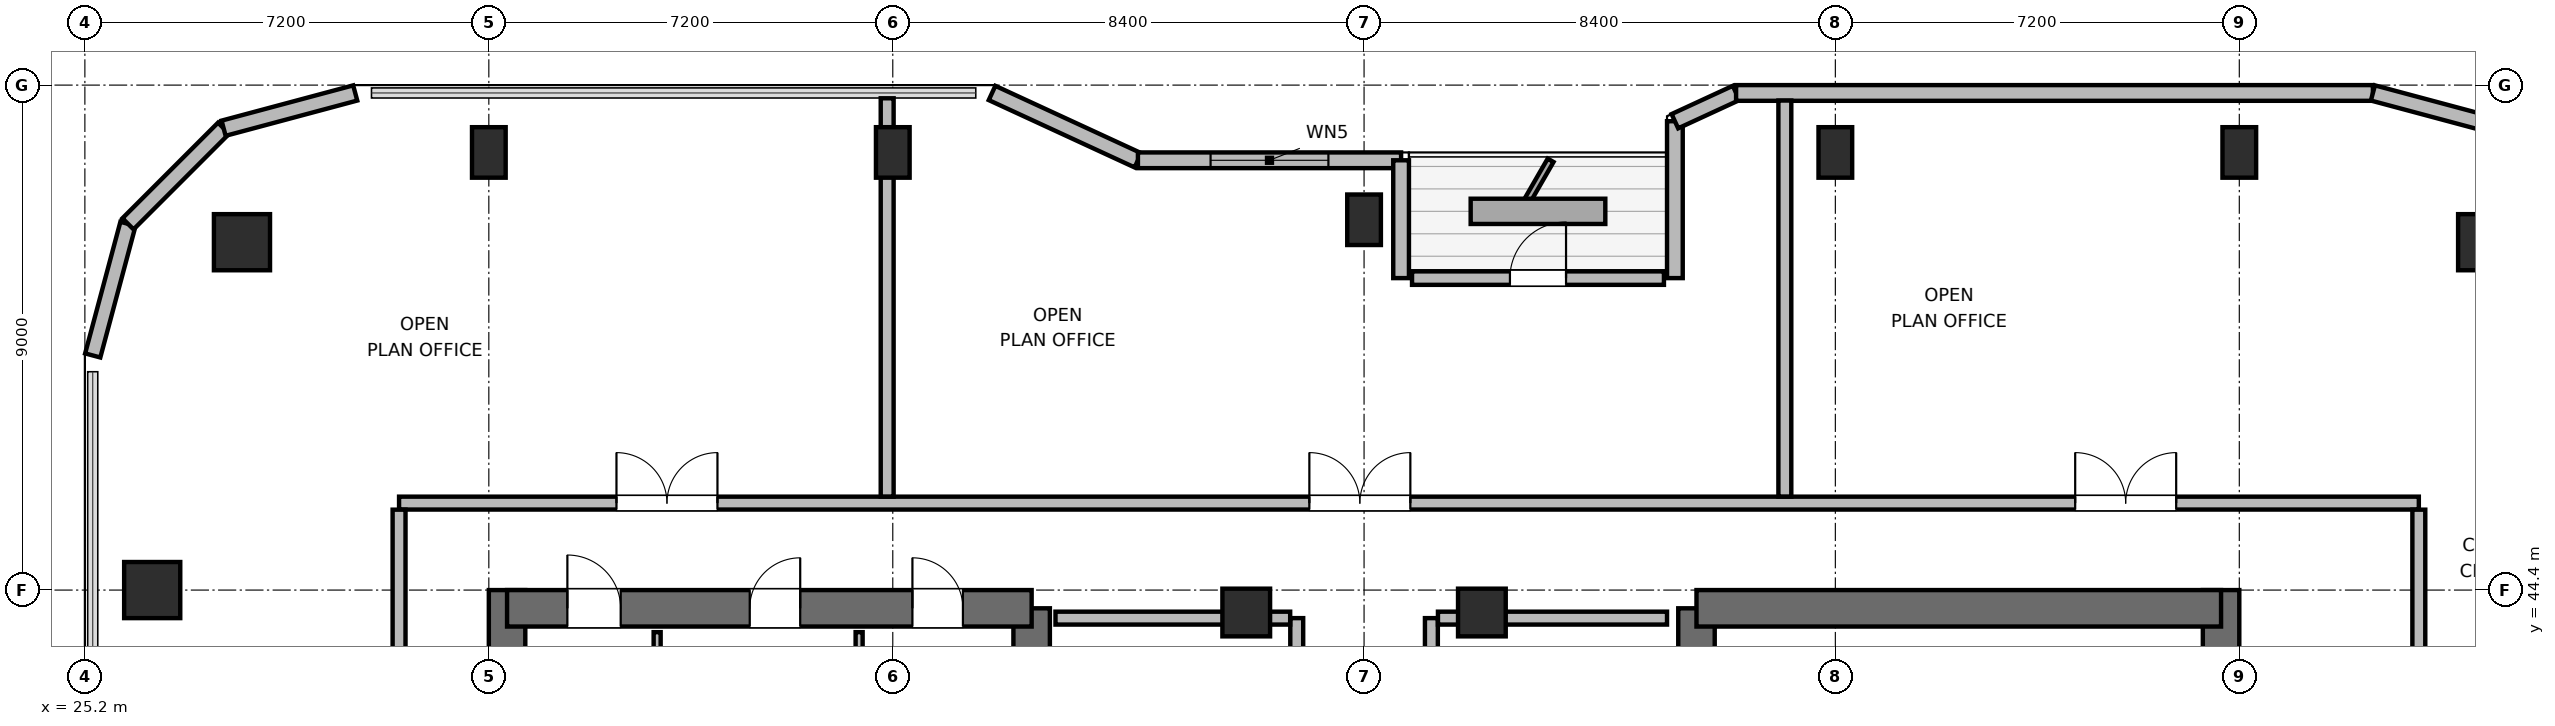
"""IFC4 building model, lengths in metres.
Left out: names, types, materials, properties, quantities, classifications, styles, units other than length and angle.
Written with IfcOpenShell. Run it as: python <this file> out.ifc"""

import sys

from ifc_helpers import new_model, si_unit, direction, frame, frame_2d, origin, origin_2d, place, context, subcontext, project, spatial, rectangle, circle, extrude, element, fill, save


model = new_model("IFC4")
c1 = context("Model", 3, precision=1e-05, world=origin(), true_north=direction((0.0, 1.0)))
c2 = subcontext(c1, "Body", "Model", "MODEL_VIEW")
j1 = project(units=[si_unit("LENGTHUNIT", "METRE"), si_unit("PLANEANGLEUNIT", "RADIAN")], contexts=[c1])
p1 = place(None, origin())
s1 = spatial("IfcSite", under=j1, at=p1, CompositionType="ELEMENT")
p2 = place(p1, origin())
s2 = spatial("IfcBuilding", under=s1, at=p2, CompositionType="ELEMENT")
p3 = place(p2, frame((0.0, 0.0, 255.0)))
s3 = spatial("IfcBuildingStorey", under=s2, at=p3, CompositionType="ELEMENT", Elevation=255.0)
p4 = place(p3, frame((32.725, 27.6, 0.0), z_axis=(0.0, 0.0, 1.0), x_axis=(0.0, 1.0, 0.0)))
e1 = element("IfcWall", 1, at=p4, inside=s3, PredefinedType="SHEAR", context=c2, shape_type="SweptSolid", body=[
    extrude(rectangle(XDim=16.8, YDim=0.65, at=frame_2d((8.4, 0.0))), origin(), (0.0, 0.0, 1.0), 3.9),
])
p5 = place(p3, frame((42.075, 37.8, 0.0), z_axis=(0.0, 0.0, 1.0), x_axis=(0.0, 1.0, 0.0)))
e2 = element("IfcWall", 2, at=p5, inside=s3, PredefinedType="SHEAR", context=c2, shape_type="SweptSolid", body=[
    extrude(rectangle(XDim=6.275, YDim=0.65, at=frame_2d((3.137, 0.0))), origin(), (0.0, 0.0, 1.0), 3.9),
])
p6 = place(p3, frame((32.725, 44.075, 0.0), z_axis=(0.0, 0.0, 1.0), x_axis=(1.0, 0.0, 0.0)))
e3 = element("IfcWall", 3, at=p6, inside=s3, PredefinedType="SHEAR", context=c2, shape_type="SweptSolid", body=[
    extrude(rectangle(XDim=9.35, YDim=0.65, at=frame_2d((4.675, 0.0))), origin(), (0.0, 0.0, 1.0), 3.9),
])
p7 = place(p6, frame((1.075, 0.0, 0.0)))
e4 = element("IfcOpeningElement", 4, at=p7, cuts=e3, PredefinedType="OPENING", context=c2, shape_type="SweptSolid", body=[
    extrude(rectangle(XDim=0.95, YDim=2.04, at=frame_2d((0.475, 1.02))), frame((0.0, 0.335, 0.0), z_axis=(0.0, -1.0, 0.0), x_axis=(1.0, 0.0, 0.0)), (0.0, 0.0, 1.0), 0.67),
])
p8 = place(p6, frame((4.325, 0.0, 0.0)))
e5 = element("IfcOpeningElement", 5, at=p8, cuts=e3, PredefinedType="OPENING", context=c2, shape_type="SweptSolid", body=[
    extrude(rectangle(XDim=0.9, YDim=2.02, at=frame_2d((0.45, 1.01))), frame((0.0, 0.335, 0.0), z_axis=(0.0, -1.0, 0.0), x_axis=(1.0, 0.0, 0.0)), (0.0, 0.0, 1.0), 0.67),
])
p9 = place(p6, frame((7.225, 0.0, 0.0)))
e6 = element("IfcOpeningElement", 6, at=p9, cuts=e3, PredefinedType="OPENING", context=c2, shape_type="SweptSolid", body=[
    extrude(rectangle(XDim=0.9, YDim=2.02, at=frame_2d((0.45, 1.01))), frame((0.0, 0.335, 0.0), z_axis=(0.0, -1.0, 0.0), x_axis=(1.0, 0.0, 0.0)), (0.0, 0.0, 1.0), 0.67),
])
p10 = place(p3, frame((53.925, 38.0, 0.0), z_axis=(0.0, 0.0, 1.0), x_axis=(0.0, 1.0, 0.0)))
e7 = element("IfcWall", 7, at=p10, inside=s3, PredefinedType="SHEAR", context=c2, shape_type="SweptSolid", body=[
    extrude(rectangle(XDim=6.075, YDim=0.65, at=frame_2d((3.038, 0.0))), origin(), (0.0, 0.0, 1.0), 3.9),
])
p11 = place(p3, frame((63.275, 27.6, 0.0), z_axis=(0.0, 0.0, 1.0), x_axis=(0.0, 1.0, 0.0)))
e8 = element("IfcWall", 8, at=p11, inside=s3, PredefinedType="SHEAR", context=c2, shape_type="SweptSolid", body=[
    extrude(rectangle(XDim=16.8, YDim=0.65, at=frame_2d((8.4, 0.0))), origin(), (0.0, 0.0, 1.0), 3.9),
])
p12 = place(p3, frame((53.925, 44.075, 0.0), z_axis=(0.0, 0.0, 1.0), x_axis=(1.0, 0.0, 0.0)))
e9 = element("IfcWall", 9, at=p12, inside=s3, PredefinedType="SHEAR", context=c2, shape_type="SweptSolid", body=[
    extrude(rectangle(XDim=9.35, YDim=0.65, at=frame_2d((4.675, 0.0))), origin(), (0.0, 0.0, 1.0), 3.9),
])
for number, where, z_axis, x_axis in (
    (10, (68.0, 50.6, 0.0), (0.0, 0.0, 1.0), (1.0, 0.0, 0.0)),
    (11, (28.0, 50.6, 0.0), (0.0, 0.0, 1.0), (1.0, 0.0, 0.0)),
):
    element("IfcColumn", number, at=place(p3, frame(where, z_axis=z_axis, x_axis=x_axis)), inside=s3, PredefinedType="COLUMN", context=c2, shape_type="SweptSolid", body=[
        extrude(circle(Radius=0.5, at=origin_2d()), origin(), (0.0, 0.0, 1.0), 3.9),
    ])
for number, where, z_axis, x_axis in (
    (12, (32.4, 52.2, 0.0), (0.0, 0.0, 1.0), (1.0, 0.0, 0.0)),
    (13, (39.6, 52.2, 0.0), (0.0, 0.0, 1.0), (1.0, 0.0, 0.0)),
    (14, (48.0, 51.0, 0.0), (0.0, 0.0, 1.0), (1.0, 0.0, 0.0)),
    (15, (56.4, 52.2, 0.0), (0.0, 0.0, 1.0), (1.0, 0.0, 0.0)),
    (16, (63.6, 52.2, 0.0), (0.0, 0.0, 1.0), (1.0, 0.0, 0.0)),
):
    element("IfcColumn", number, at=place(p3, frame(where, z_axis=z_axis, x_axis=x_axis)), inside=s3, PredefinedType="COLUMN", context=c2, shape_type="SweptSolid", body=[
        extrude(rectangle(XDim=0.6, YDim=0.9, at=origin_2d()), origin(), (0.0, 0.0, 1.0), 3.9),
    ])
p13 = place(p3, frame((26.4, 44.4, 0.0), z_axis=(0.0, 0.0, 1.0), x_axis=(1.0, 0.0, 0.0)))
e17 = element("IfcColumn", 17, at=p13, inside=s3, PredefinedType="COLUMN", context=c2, shape_type="SweptSolid", body=[
    extrude(rectangle(XDim=1.0, YDim=1.0, at=origin_2d()), origin(), (0.0, 0.0, 1.0), 3.9),
])
for number, where, z_axis, x_axis in (
    (18, (45.9, 44.0, 0.0), (0.0, 0.0, 1.0), (1.0, 0.0, 0.0)),
    (19, (50.1, 44.0, 0.0), (0.0, 0.0, 1.0), (1.0, 0.0, 0.0)),
):
    element("IfcColumn", number, at=place(p3, frame(where, z_axis=z_axis, x_axis=x_axis)), inside=s3, PredefinedType="COLUMN", context=c2, shape_type="SweptSolid", body=[
        extrude(rectangle(XDim=0.85, YDim=0.85, at=origin_2d()), origin(), (0.0, 0.0, 1.0), 3.9),
    ])
p14 = place(p3, frame((25.34, 48.582, 0.0), z_axis=(0.0, 0.0, 1.0), x_axis=(0.258751159445, 0.965944013639, 0.0)))
e20 = element("IfcWall", 20, at=p14, inside=s3, PredefinedType="SOLIDWALL", context=c2, shape_type="SweptSolid", body=[
    extrude(rectangle(XDim=2.429, YDim=0.28, at=frame_2d((1.214, 0.0))), origin(), (0.0, 0.0, 1.0), 3.68),
])
p15 = place(p3, frame((25.969, 50.927, 0.0), z_axis=(0.0, 0.0, 1.0), x_axis=(0.707106781187, 0.707106781187, 0.0)))
e21 = element("IfcWall", 21, at=p15, inside=s3, PredefinedType="SOLIDWALL", context=c2, shape_type="SweptSolid", body=[
    extrude(rectangle(XDim=2.41, YDim=0.28, at=frame_2d((1.205, 0.0))), origin(), (0.0, 0.0, 1.0), 3.68),
])
p16 = place(p3, frame((27.673, 52.632, 0.0), z_axis=(0.0, 0.0, 1.0), x_axis=(0.965937282298, 0.25877628691, 0.0)))
e22 = element("IfcWall", 22, at=p16, inside=s3, PredefinedType="SOLIDWALL", context=c2, shape_type="SweptSolid", body=[
    extrude(rectangle(XDim=2.428, YDim=0.28, at=frame_2d((1.214, 0.0))), origin(), (0.0, 0.0, 1.0), 3.68),
])
p17 = place(p3, frame((41.369, 53.26, 0.0), z_axis=(0.0, 0.0, 1.0), x_axis=(0.907956889006, -0.419063584324, 0.0)))
e23 = element("IfcWall", 23, at=p17, inside=s3, PredefinedType="SOLIDWALL", context=c2, shape_type="SweptSolid", body=[
    extrude(rectangle(XDim=2.864, YDim=0.28, at=frame_2d((1.432, 0.0))), origin(), (0.0, 0.0, 1.0), 2.265),
])
p18 = place(p3, frame((43.969, 52.06, 0.0), z_axis=(0.0, 0.0, 1.0), x_axis=(1.0, 0.0, 0.0)))
e24 = element("IfcWall", 24, at=p18, inside=s3, PredefinedType="SOLIDWALL", context=c2, shape_type="SweptSolid", body=[
    extrude(rectangle(XDim=4.691, YDim=0.28, at=frame_2d((2.345, 0.0))), origin(), (0.0, 0.0, 1.0), 2.265),
])
p19 = place(p18, frame((1.295, 0.0, 0.85)))
e25 = element("IfcOpeningElement", 25, at=p19, cuts=e24, PredefinedType="OPENING", context=c2, shape_type="SweptSolid", body=[
    extrude(rectangle(XDim=2.1, YDim=1.05, at=frame_2d((1.05, 0.525))), frame((0.0, 0.15, 0.0), z_axis=(0.0, -1.0, 0.0), x_axis=(1.0, 0.0, 0.0)), (0.0, 0.0, 1.0), 0.3),
])
p20 = place(p3, frame((48.66, 52.06, 0.0), z_axis=(0.0, 0.0, 1.0), x_axis=(0.0, -1.0, 0.0)))
e26 = element("IfcWall", 26, at=p20, inside=s3, PredefinedType="SOLIDWALL", context=c2, shape_type="SweptSolid", body=[
    extrude(rectangle(XDim=2.1, YDim=0.28, at=frame_2d((1.05, 0.0))), origin(), (0.0, 0.0, 1.0), 2.265),
])
p21 = place(p3, frame((48.855, 49.96, 0.0), z_axis=(0.0, 0.0, 1.0), x_axis=(1.0, 0.0, 0.0)))
e27 = element("IfcWall", 27, at=p21, inside=s3, PredefinedType="SOLIDWALL", context=c2, shape_type="SweptSolid", body=[
    extrude(rectangle(XDim=4.49, YDim=0.24, at=frame_2d((2.245, 0.0))), origin(), (0.0, 0.0, 1.0), 2.215),
])
p22 = place(p21, frame((1.745, 0.0, 0.0)))
e28 = element("IfcOpeningElement", 28, at=p22, cuts=e27, PredefinedType="OPENING", context=c2, shape_type="SweptSolid", body=[
    extrude(rectangle(XDim=1.0, YDim=2.02, at=frame_2d((0.5, 1.01))), frame((0.0, 0.13, 0.0), z_axis=(0.0, -1.0, 0.0), x_axis=(1.0, 0.0, 0.0)), (0.0, 0.0, 1.0), 0.26),
])
p23 = place(p3, frame((53.54, 49.96, 0.0), z_axis=(0.0, 0.0, 1.0), x_axis=(0.0, 1.0, 0.0)))
e29 = element("IfcWall", 29, at=p23, inside=s3, PredefinedType="SOLIDWALL", context=c2, shape_type="SweptSolid", body=[
    extrude(rectangle(XDim=2.796, YDim=0.28, at=frame_2d((1.398, 0.0))), origin(), (0.0, 0.0, 1.0), 2.265),
])
p24 = place(p3, frame((53.54, 52.756, 0.0), z_axis=(0.0, 0.0, 1.0), x_axis=(0.907893953211, 0.419199916176, 0.0)))
e30 = element("IfcWall", 30, at=p24, inside=s3, PredefinedType="SOLIDWALL", context=c2, shape_type="SweptSolid", body=[
    extrude(rectangle(XDim=1.201, YDim=0.28, at=frame_2d((0.601, 0.0))), origin(), (0.0, 0.0, 1.0), 3.68),
])
p25 = place(p3, frame((54.631, 53.26, 0.0), z_axis=(0.0, 0.0, 1.0), x_axis=(1.0, 0.0, 0.0)))
e31 = element("IfcWall", 31, at=p25, inside=s3, PredefinedType="SOLIDWALL", context=c2, shape_type="SweptSolid", body=[
    extrude(rectangle(XDim=11.351, YDim=0.28, at=frame_2d((5.675, 0.0))), origin(), (0.0, 0.0, 1.0), 3.68),
])
p26 = place(p3, frame((65.982, 53.26, 0.0), z_axis=(0.0, 0.0, 1.0), x_axis=(0.965937282298, -0.25877628691, 0.0)))
e32 = element("IfcWall", 32, at=p26, inside=s3, PredefinedType="SOLIDWALL", context=c2, shape_type="SweptSolid", body=[
    extrude(rectangle(XDim=2.428, YDim=0.28, at=frame_2d((1.214, 0.0))), origin(), (0.0, 0.0, 1.0), 3.68),
])
for number, where, z_axis, x_axis in (
    (33, (35.4, 41.095, 0.0), (0.0, 0.0, 1.0), (0.0, 1.0, 0.0)),
    (34, (39.0, 41.095, 0.0), (0.0, 0.0, 1.0), (0.0, 1.0, 0.0)),
):
    element("IfcWall", number, at=place(p3, frame(where, z_axis=z_axis, x_axis=x_axis)), inside=s3, PredefinedType="PARTITIONING", context=c2, shape_type="SweptSolid", body=[
        extrude(rectangle(XDim=2.555, YDim=0.125, at=frame_2d((1.277, 0.0))), origin(), (0.0, 0.0, 1.0), 3.68),
    ])
p27 = place(p3, frame((46.8, 37.9, 0.0), z_axis=(0.0, 0.0, 1.0), x_axis=(0.0, 1.0, 0.0)))
e35 = element("IfcWall", 35, at=p27, inside=s3, PredefinedType="PARTITIONING", context=c2, shape_type="SweptSolid", body=[
    extrude(rectangle(XDim=6.0, YDim=0.23, at=frame_2d((3.0, 0.0))), origin(), (0.0, 0.0, 1.0), 3.68),
])
p28 = place(p27, frame((2.55, 0.0, 0.0)))
e36 = element("IfcOpeningElement", 36, at=p28, cuts=e35, PredefinedType="OPENING", context=c2, shape_type="SweptSolid", body=[
    extrude(rectangle(XDim=0.9, YDim=2.02, at=frame_2d((0.45, 1.01))), frame((0.0, 0.125, 0.0), z_axis=(0.0, -1.0, 0.0), x_axis=(1.0, 0.0, 0.0)), (0.0, 0.0, 1.0), 0.25),
])
p29 = place(p3, frame((42.5, 43.9, 0.0), z_axis=(0.0, 0.0, 1.0), x_axis=(1.0, 0.0, 0.0)))
e37 = element("IfcWall", 37, at=p29, inside=s3, PredefinedType="PARTITIONING", context=c2, shape_type="SweptSolid", body=[
    extrude(rectangle(XDim=4.183, YDim=0.23, at=frame_2d((2.092, 0.0))), origin(), (0.0, 0.0, 1.0), 2.765),
])
p30 = place(p3, frame((49.2, 37.9, 0.0), z_axis=(0.0, 0.0, 1.0), x_axis=(0.0, 1.0, 0.0)))
e38 = element("IfcWall", 38, at=p30, inside=s3, PredefinedType="PARTITIONING", context=c2, shape_type="SweptSolid", body=[
    extrude(rectangle(XDim=6.0, YDim=0.23, at=frame_2d((3.0, 0.0))), origin(), (0.0, 0.0, 1.0), 3.68),
])
p31 = place(p30, frame((1.47, 0.0, 0.0)))
e39 = element("IfcOpeningElement", 39, at=p31, cuts=e38, PredefinedType="OPENING", context=c2, shape_type="SweptSolid", body=[
    extrude(rectangle(XDim=0.9, YDim=2.02, at=frame_2d((0.45, 1.01))), frame((0.0, 0.125, 0.0), z_axis=(0.0, -1.0, 0.0), x_axis=(1.0, 0.0, 0.0)), (0.0, 0.0, 1.0), 0.25),
])
p32 = place(p30, frame((4.47, 0.0, 0.0)))
e40 = element("IfcOpeningElement", 40, at=p32, cuts=e38, PredefinedType="OPENING", context=c2, shape_type="SweptSolid", body=[
    extrude(rectangle(XDim=0.9, YDim=2.02, at=frame_2d((0.45, 1.01))), frame((0.0, 0.125, 0.0), z_axis=(0.0, -1.0, 0.0), x_axis=(1.0, 0.0, 0.0)), (0.0, 0.0, 1.0), 0.25),
])
p33 = place(p3, frame((49.317, 43.9, 0.0), z_axis=(0.0, 0.0, 1.0), x_axis=(1.0, 0.0, 0.0)))
e41 = element("IfcWall", 41, at=p33, inside=s3, PredefinedType="PARTITIONING", context=c2, shape_type="SweptSolid", body=[
    extrude(rectangle(XDim=4.083, YDim=0.23, at=frame_2d((2.042, 0.0))), origin(), (0.0, 0.0, 1.0), 2.765),
])
p34 = place(p3, frame((30.8, 45.95, 0.0), z_axis=(0.0, 0.0, 1.0), x_axis=(1.0, 0.0, 0.0)))
e42 = element("IfcWall", 42, at=p34, inside=s3, PredefinedType="PARTITIONING", context=c2, shape_type="SweptSolid", body=[
    extrude(rectangle(XDim=36.0, YDim=0.23, at=frame_2d((18.0, 0.0))), origin(), (0.0, 0.0, 1.0), 3.68),
])
p35 = place(p34, frame((3.875, 0.0, 0.0)))
e43 = element("IfcOpeningElement", 43, at=p35, cuts=e42, PredefinedType="OPENING", context=c2, shape_type="SweptSolid", body=[
    extrude(rectangle(XDim=1.8, YDim=2.06, at=frame_2d((0.9, 1.03))), frame((0.0, 0.125, 0.0), z_axis=(0.0, -1.0, 0.0), x_axis=(1.0, 0.0, 0.0)), (0.0, 0.0, 1.0), 0.25),
])
p36 = place(p34, frame((16.225, 0.0, 0.0)))
e44 = element("IfcOpeningElement", 44, at=p36, cuts=e42, PredefinedType="OPENING", context=c2, shape_type="SweptSolid", body=[
    extrude(rectangle(XDim=1.8, YDim=2.06, at=frame_2d((0.9, 1.03))), frame((0.0, 0.125, 0.0), z_axis=(0.0, -1.0, 0.0), x_axis=(1.0, 0.0, 0.0)), (0.0, 0.0, 1.0), 0.25),
])
p37 = place(p34, frame((29.875, 0.0, 0.0)))
e45 = element("IfcOpeningElement", 45, at=p37, cuts=e42, PredefinedType="OPENING", context=c2, shape_type="SweptSolid", body=[
    extrude(rectangle(XDim=1.8, YDim=2.06, at=frame_2d((0.9, 1.03))), frame((0.0, 0.125, 0.0), z_axis=(0.0, -1.0, 0.0), x_axis=(1.0, 0.0, 0.0)), (0.0, 0.0, 1.0), 0.25),
])
p38 = place(p3, frame((30.8, 26.167, 0.0), z_axis=(0.0, 0.0, 1.0), x_axis=(0.0, 1.0, 0.0)))
e46 = element("IfcWall", 46, at=p38, inside=s3, PredefinedType="PARTITIONING", context=c2, shape_type="SweptSolid", body=[
    extrude(rectangle(XDim=19.666, YDim=0.23, at=frame_2d((9.833, 0.0))), origin(), (0.0, 0.0, 1.0), 3.68),
])
p39 = place(p38, frame((9.358, 0.0, 0.0)))
e47 = element("IfcOpeningElement", 47, at=p39, cuts=e46, PredefinedType="OPENING", context=c2, shape_type="SweptSolid", body=[
    extrude(rectangle(XDim=1.8, YDim=2.06, at=frame_2d((0.9, 1.03))), frame((0.0, 0.125, 0.0), z_axis=(0.0, -1.0, 0.0), x_axis=(1.0, 0.0, 0.0)), (0.0, 0.0, 1.0), 0.25),
])
p40 = place(p3, frame((66.8, 26.167, 0.0), z_axis=(0.0, 0.0, 1.0), x_axis=(0.0, 1.0, 0.0)))
e48 = element("IfcWall", 48, at=p40, inside=s3, PredefinedType="PARTITIONING", context=c2, shape_type="SweptSolid", body=[
    extrude(rectangle(XDim=19.666, YDim=0.23, at=frame_2d((9.833, 0.0))), origin(), (0.0, 0.0, 1.0), 3.68),
])
p41 = place(p40, frame((4.983, 0.0, 0.0)))
e49 = element("IfcOpeningElement", 49, at=p41, cuts=e48, PredefinedType="OPENING", context=c2, shape_type="SweptSolid", body=[
    extrude(rectangle(XDim=1.8, YDim=2.06, at=frame_2d((0.9, 1.03))), frame((0.0, 0.125, 0.0), z_axis=(0.0, -1.0, 0.0), x_axis=(1.0, 0.0, 0.0)), (0.0, 0.0, 1.0), 0.25),
])
p42 = place(p40, frame((14.933, 0.0, 0.0)))
e50 = element("IfcOpeningElement", 50, at=p42, cuts=e48, PredefinedType="OPENING", context=c2, shape_type="SweptSolid", body=[
    extrude(rectangle(XDim=1.8, YDim=2.06, at=frame_2d((0.9, 1.03))), frame((0.0, 0.125, 0.0), z_axis=(0.0, -1.0, 0.0), x_axis=(1.0, 0.0, 0.0)), (0.0, 0.0, 1.0), 0.25),
])
p43 = place(p3, frame((39.5, 46.067, 0.0), z_axis=(0.0, 0.0, 1.0), x_axis=(0.0, 1.0, 0.0)))
e51 = element("IfcWall", 51, at=p43, inside=s3, PredefinedType="PARTITIONING", context=c2, shape_type="SweptSolid", body=[
    extrude(rectangle(XDim=7.098, YDim=0.23, at=frame_2d((3.549, 0.0))), origin(), (0.0, 0.0, 1.0), 3.043),
])
p44 = place(p3, frame((55.5, 46.067, 0.0), z_axis=(0.0, 0.0, 1.0), x_axis=(0.0, 1.0, 0.0)))
e52 = element("IfcWall", 52, at=p44, inside=s3, PredefinedType="PARTITIONING", context=c2, shape_type="SweptSolid", body=[
    extrude(rectangle(XDim=7.058, YDim=0.23, at=frame_2d((3.529, 0.0))), origin(), (0.0, 0.0, 1.0), 3.043),
])
p45 = place(p19, origin())
e53 = element("IfcWindow", 53, at=p45, inside=s3, PartitioningType="SINGLE_PANEL", PredefinedType="WINDOW", context=c2, shape_type="SweptSolid", body=[
    extrude(rectangle(XDim=2.1, YDim=1.05, at=frame_2d((1.05, 0.525))), frame((0.0, 0.03, 0.0), z_axis=(0.0, -1.0, 0.0), x_axis=(1.0, 0.0, 0.0)), (0.0, 0.0, 1.0), 0.06),
])
fill(e25, e53)
p46 = place(p22, origin())
e54 = element("IfcDoor", 54, at=p46, inside=s3, OperationType="SINGLE_SWING_RIGHT", PredefinedType="DOOR", context=c2, shape_type="SweptSolid", body=[
    extrude(rectangle(XDim=1.0, YDim=2.02, at=frame_2d((0.5, 1.01))), frame((0.0, 0.025, 0.0), z_axis=(0.0, -1.0, 0.0), x_axis=(1.0, 0.0, 0.0)), (0.0, 0.0, 1.0), 0.05),
])
fill(e28, e54)
p47 = place(p7, origin())
e55 = element("IfcDoor", 55, at=p47, inside=s3, OperationType="SINGLE_SWING_LEFT", PredefinedType="DOOR", context=c2, shape_type="SweptSolid", body=[
    extrude(rectangle(XDim=0.95, YDim=2.04, at=frame_2d((0.475, 1.02))), frame((0.0, 0.025, 0.0), z_axis=(0.0, -1.0, 0.0), x_axis=(1.0, 0.0, 0.0)), (0.0, 0.0, 1.0), 0.05),
])
fill(e4, e55)
p48 = place(p8, origin())
e56 = element("IfcDoor", 56, at=p48, inside=s3, OperationType="SINGLE_SWING_RIGHT", PredefinedType="DOOR", context=c2, shape_type="SweptSolid", body=[
    extrude(rectangle(XDim=0.9, YDim=2.02, at=frame_2d((0.45, 1.01))), frame((0.0, 0.025, 0.0), z_axis=(0.0, -1.0, 0.0), x_axis=(1.0, 0.0, 0.0)), (0.0, 0.0, 1.0), 0.05),
])
fill(e5, e56)
p49 = place(p9, origin())
e57 = element("IfcDoor", 57, at=p49, inside=s3, OperationType="SINGLE_SWING_LEFT", PredefinedType="DOOR", context=c2, shape_type="SweptSolid", body=[
    extrude(rectangle(XDim=0.9, YDim=2.02, at=frame_2d((0.45, 1.01))), frame((0.0, 0.025, 0.0), z_axis=(0.0, -1.0, 0.0), x_axis=(1.0, 0.0, 0.0)), (0.0, 0.0, 1.0), 0.05),
])
fill(e6, e57)
p50 = place(p35, origin())
e58 = element("IfcDoor", 58, at=p50, inside=s3, OperationType="DOUBLE_DOOR_SINGLE_SWING", PredefinedType="DOOR", context=c2, shape_type="SweptSolid", body=[
    extrude(rectangle(XDim=1.8, YDim=2.06, at=frame_2d((0.9, 1.03))), frame((0.0, 0.025, 0.0), z_axis=(0.0, -1.0, 0.0), x_axis=(1.0, 0.0, 0.0)), (0.0, 0.0, 1.0), 0.05),
])
fill(e43, e58)
p51 = place(p36, origin())
e59 = element("IfcDoor", 59, at=p51, inside=s3, OperationType="DOUBLE_DOOR_SINGLE_SWING", PredefinedType="DOOR", context=c2, shape_type="SweptSolid", body=[
    extrude(rectangle(XDim=1.8, YDim=2.06, at=frame_2d((0.9, 1.03))), frame((0.0, 0.025, 0.0), z_axis=(0.0, -1.0, 0.0), x_axis=(1.0, 0.0, 0.0)), (0.0, 0.0, 1.0), 0.05),
])
fill(e44, e59)
p52 = place(p37, origin())
e60 = element("IfcDoor", 60, at=p52, inside=s3, OperationType="DOUBLE_DOOR_SINGLE_SWING", PredefinedType="DOOR", context=c2, shape_type="SweptSolid", body=[
    extrude(rectangle(XDim=1.8, YDim=2.06, at=frame_2d((0.9, 1.03))), frame((0.0, 0.025, 0.0), z_axis=(0.0, -1.0, 0.0), x_axis=(1.0, 0.0, 0.0)), (0.0, 0.0, 1.0), 0.05),
])
fill(e45, e60)
save(model, sys.argv[1])
